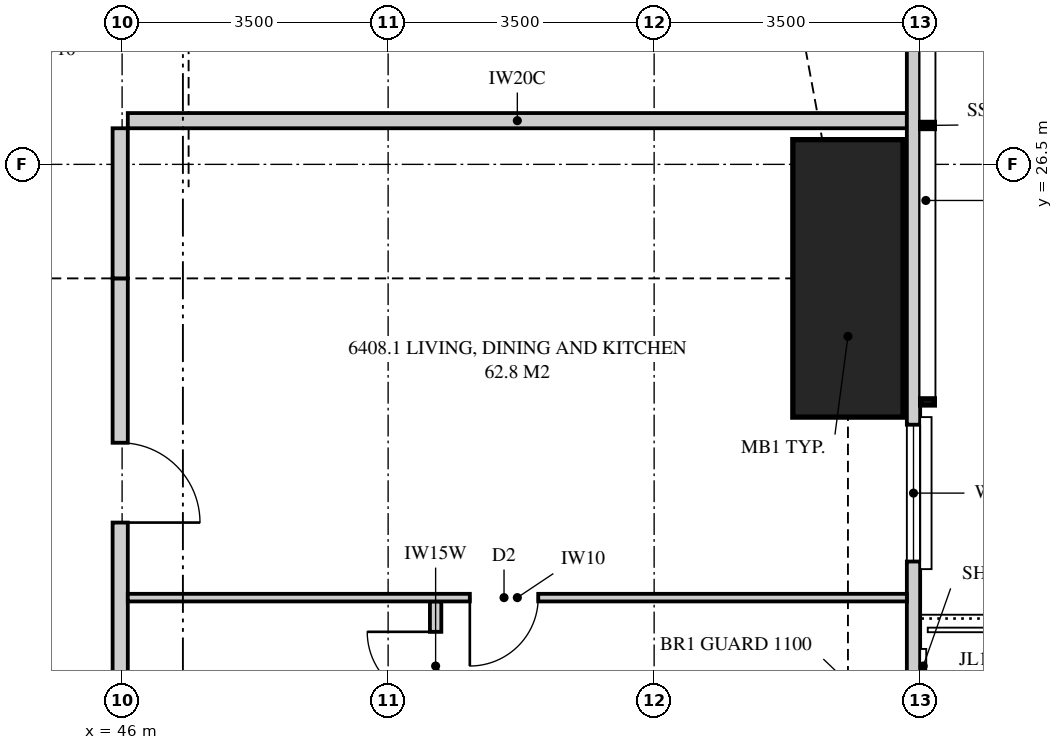
"""IFC4 building model, lengths in metres.
Left out: names, types, materials, properties, quantities, classifications, styles, units other than length and angle.
Written with IfcOpenShell. Run it as: python <this file> out.ifc"""

import sys

from ifc_helpers import new_model, si_unit, direction, frame, frame_2d, origin, origin_2d, place, context, subcontext, project, spatial, polyline, rectangle, outline, extrude, element, fill, save


model = new_model("IFC4")
c1 = context("Model", 3, precision=1e-05, world=origin(), true_north=direction((0.0, 1.0)))
c2 = subcontext(c1, "Body", "Model", "MODEL_VIEW")
j1 = project(units=[si_unit("LENGTHUNIT", "METRE"), si_unit("PLANEANGLEUNIT", "RADIAN")], contexts=[c1])
p1 = place(None, origin())
s1 = spatial("IfcSite", under=j1, at=p1, CompositionType="ELEMENT")
p2 = place(p1, origin())
s2 = spatial("IfcBuilding", under=s1, at=p2, CompositionType="ELEMENT")
p3 = place(p2, frame((0.0, 0.0, 235.45)))
s3 = spatial("IfcBuildingStorey", under=s2, at=p3, CompositionType="ELEMENT", Elevation=235.45)
p4 = place(p3, frame((55.55, 25.0, 0.0), z_axis=(0.0, 0.0, 1.0), x_axis=(1.0, 0.0, 0.0)))
e1 = element("IfcColumn", 1, at=p4, inside=s3, PredefinedType="COLUMN", context=c2, shape_type="SweptSolid", body=[
    extrude(rectangle(XDim=1.45, YDim=3.65, at=origin_2d()), origin(), (0.0, 0.0, 1.0), 3.5),
])
p5 = place(p3, frame((56.413, 3.051, 0.0), z_axis=(0.0, 0.0, 1.0), x_axis=(0.0, 1.0, 0.0)))
e2 = element("IfcWall", 2, at=p5, inside=s3, PredefinedType="SOLIDWALL", context=c2, shape_type="SweptSolid", body=[
    extrude(outline(polyline([(0.0, 0.0), (27.897, 0.0), (27.897, 3.26), (22.157, 3.26), (22.157, 2.3), (22.092, 2.3), (22.092, 3.26), (21.949, 3.26), (21.949, 2.3), (9.949, 2.3), (9.949, 3.26), (9.858, 3.26), (9.858, 2.3), (9.688, 2.3), (9.688, 3.26), (0.0, 3.26), (0.0, 0.0)])), frame((0.0, 0.087, 0.0), z_axis=(0.0, -1.0, 0.0), x_axis=(1.0, 0.0, 0.0)), (0.0, 0.0, 1.0), 0.175),
])
p6 = place(p5, frame((1.187, 0.0, 0.4)))
e3 = element("IfcOpeningElement", 3, at=p6, cuts=e2, PredefinedType="OPENING", context=c2, shape_type="SweptSolid", body=[
    extrude(rectangle(XDim=2.4, YDim=1.85, at=frame_2d((1.2, 0.925))), frame((0.0, 0.097, 0.0), z_axis=(0.0, -1.0, 0.0), x_axis=(1.0, 0.0, 0.0)), (0.0, 0.0, 1.0), 0.195),
])
p7 = place(p5, frame((11.897, 0.0, 0.4)))
e4 = element("IfcOpeningElement", 4, at=p7, cuts=e2, PredefinedType="OPENING", context=c2, shape_type="SweptSolid", body=[
    extrude(rectangle(XDim=1.8, YDim=1.85, at=frame_2d((0.9, 0.925))), frame((0.0, 0.097, 0.0), z_axis=(0.0, -1.0, 0.0), x_axis=(1.0, 0.0, 0.0)), (0.0, 0.0, 1.0), 0.195),
])
p8 = place(p5, frame((14.824, 0.0, 0.0)))
e5 = element("IfcOpeningElement", 5, at=p8, cuts=e2, PredefinedType="OPENING", context=c2, shape_type="SweptSolid", body=[
    extrude(rectangle(XDim=1.8, YDim=2.25, at=frame_2d((0.9, 1.125))), frame((0.0, 0.097, 0.0), z_axis=(0.0, -1.0, 0.0), x_axis=(1.0, 0.0, 0.0)), (0.0, 0.0, 1.0), 0.195),
])
p9 = place(p5, frame((18.224, 0.0, 0.4)))
e6 = element("IfcOpeningElement", 6, at=p9, cuts=e2, PredefinedType="OPENING", context=c2, shape_type="SweptSolid", body=[
    extrude(rectangle(XDim=1.8, YDim=1.85, at=frame_2d((0.9, 0.925))), frame((0.0, 0.097, 0.0), z_axis=(0.0, -1.0, 0.0), x_axis=(1.0, 0.0, 0.0)), (0.0, 0.0, 1.0), 0.195),
])
p10 = place(p3, frame((46.075, 27.075, 0.0), z_axis=(0.0, 0.0, 1.0), x_axis=(1.0, 0.0, 0.0)))
e7 = element("IfcWall", 7, at=p10, inside=s3, PredefinedType="PARTITIONING", context=c2, shape_type="SweptSolid", body=[
    extrude(outline(polyline([(0.0, 0.0), (10.25, 0.0), (10.25, 3.26), (10.017, 3.26), (10.017, 2.3), (8.166, 2.3), (8.166, 3.26), (2.11, 3.26), (2.11, 2.66), (0.0, 2.66), (0.0, 3.26), (0.0, 0.0)])), frame((0.0, 0.1, 0.0), z_axis=(0.0, -1.0, 0.0), x_axis=(1.0, 0.0, 0.0)), (0.0, 0.0, 1.0), 0.2),
])
p11 = place(p3, frame((45.975, 17.6, 0.0), z_axis=(0.0, 0.0, 1.0), x_axis=(0.0, 1.0, 0.0)))
e8 = element("IfcWall", 8, at=p11, inside=s3, PredefinedType="PARTITIONING", context=c2, shape_type="SweptSolid", body=[
    extrude(outline(polyline([(0.0, 0.0), (7.4, 0.0), (7.4, 2.66), (6.09, 2.66), (6.09, 3.26), (2.46, 3.26), (2.46, 2.66), (0.0, 2.66), (0.0, 0.0)])), frame((0.0, 0.1, 0.0), z_axis=(0.0, -1.0, 0.0), x_axis=(1.0, 0.0, 0.0)), (0.0, 0.0, 1.0), 0.2),
])
p12 = place(p11, frame((4.188, 0.0, 0.0)))
e9 = element("IfcOpeningElement", 9, at=p12, cuts=e8, PredefinedType="OPENING", context=c2, shape_type="SweptSolid", body=[
    extrude(rectangle(XDim=1.05, YDim=2.2, at=frame_2d((0.525, 1.1))), frame((0.0, 0.11, 0.0), z_axis=(0.0, -1.0, 0.0), x_axis=(1.0, 0.0, 0.0)), (0.0, 0.0, 1.0), 0.22),
])
p13 = place(p3, frame((45.975, 25.0, 0.0), z_axis=(0.0, 0.0, 1.0), x_axis=(0.0, 1.0, 0.0)))
e10 = element("IfcWall", 10, at=p13, inside=s3, PredefinedType="PARTITIONING", context=c2, shape_type="SweptSolid", body=[
    extrude(rectangle(XDim=1.975, YDim=0.2, at=frame_2d((0.988, 0.0))), origin(), (0.0, 0.0, 1.0), 2.66),
])
p14 = place(p3, frame((56.325, 20.8, 0.0), z_axis=(0.0, 0.0, 1.0), x_axis=(-1.0, 0.0, 0.0)))
e11 = element("IfcWall", 11, at=p14, inside=s3, PredefinedType="PARTITIONING", context=c2, shape_type="SweptSolid", body=[
    extrude(outline(polyline([(0.0, 0.0), (10.25, 0.0), (10.25, 3.26), (1.635, 3.26), (1.635, 2.3), (0.0, 2.3), (0.0, 3.26), (0.0, 0.0)])), frame((0.0, 0.05, 0.0), z_axis=(0.0, -1.0, 0.0), x_axis=(1.0, 0.0, 0.0)), (0.0, 0.0, 1.0), 0.1),
])
p15 = place(p14, frame((4.85, 0.0, 0.0)))
e12 = element("IfcOpeningElement", 12, at=p15, cuts=e11, PredefinedType="OPENING", context=c2, shape_type="SweptSolid", body=[
    extrude(rectangle(XDim=0.9, YDim=2.1, at=frame_2d((0.45, 1.05))), frame((0.0, 0.06, 0.0), z_axis=(0.0, -1.0, 0.0), x_axis=(1.0, 0.0, 0.0)), (0.0, 0.0, 1.0), 0.12),
])
p16 = place(p3, frame((50.125, 17.6, 0.0), z_axis=(0.0, 0.0, 1.0), x_axis=(0.0, 1.0, 0.0)))
e13 = element("IfcWall", 13, at=p16, inside=s3, PredefinedType="PLUMBINGWALL", context=c2, shape_type="SweptSolid", body=[
    extrude(outline(polyline([(0.0, 0.0), (3.15, 0.0), (3.15, 3.26), (2.435, 3.26), (2.435, 2.66), (0.0, 2.66), (0.0, 3.26), (0.0, 0.0)])), frame((0.0, 0.075, 0.0), z_axis=(0.0, -1.0, 0.0), x_axis=(1.0, 0.0, 0.0)), (0.0, 0.0, 1.0), 0.15),
])
p17 = place(p16, frame((1.85, 0.0, 0.0)))
e14 = element("IfcOpeningElement", 14, at=p17, cuts=e13, PredefinedType="OPENING", context=c2, shape_type="SweptSolid", body=[
    extrude(rectangle(XDim=0.9, YDim=2.1, at=frame_2d((0.45, 1.05))), frame((0.0, 0.085, 0.0), z_axis=(0.0, -1.0, 0.0), x_axis=(1.0, 0.0, 0.0)), (0.0, 0.0, 1.0), 0.17),
])
p18 = place(p9, origin())
e15 = element("IfcWindow", 15, at=p18, inside=s3, PartitioningType="SINGLE_PANEL", PredefinedType="WINDOW", context=c2, shape_type="SweptSolid", body=[
    extrude(rectangle(XDim=1.8, YDim=1.85, at=frame_2d((0.9, 0.925))), frame((0.0, 0.03, 0.0), z_axis=(0.0, -1.0, 0.0), x_axis=(1.0, 0.0, 0.0)), (0.0, 0.0, 1.0), 0.06),
])
fill(e6, e15)
p19 = place(p12, frame((1.05, 0.0, 0.0), z_axis=(0.0, 0.0, 1.0), x_axis=(-1.0, 0.0, 0.0)))
e16 = element("IfcDoor", 16, at=p19, inside=s3, OperationType="SINGLE_SWING_RIGHT", PredefinedType="DOOR", context=c2, shape_type="SweptSolid", body=[
    extrude(rectangle(XDim=1.05, YDim=2.2, at=frame_2d((0.525, 1.1))), frame((0.0, 0.025, 0.0), z_axis=(0.0, -1.0, 0.0), x_axis=(1.0, 0.0, 0.0)), (0.0, 0.0, 1.0), 0.05),
])
fill(e9, e16)
p20 = place(p15, origin())
e17 = element("IfcDoor", 17, at=p20, inside=s3, OperationType="SINGLE_SWING_RIGHT", PredefinedType="DOOR", context=c2, shape_type="SweptSolid", body=[
    extrude(rectangle(XDim=0.9, YDim=2.1, at=frame_2d((0.45, 1.05))), frame((0.0, 0.025, 0.0), z_axis=(0.0, -1.0, 0.0), x_axis=(1.0, 0.0, 0.0)), (0.0, 0.0, 1.0), 0.05),
])
fill(e12, e17)
p21 = place(p17, origin())
e18 = element("IfcDoor", 18, at=p21, inside=s3, OperationType="SINGLE_SWING_RIGHT", PredefinedType="DOOR", context=c2, shape_type="SweptSolid", body=[
    extrude(rectangle(XDim=0.9, YDim=2.1, at=frame_2d((0.45, 1.05))), frame((0.0, 0.025, 0.0), z_axis=(0.0, -1.0, 0.0), x_axis=(1.0, 0.0, 0.0)), (0.0, 0.0, 1.0), 0.05),
])
fill(e14, e18)
save(model, sys.argv[1])
